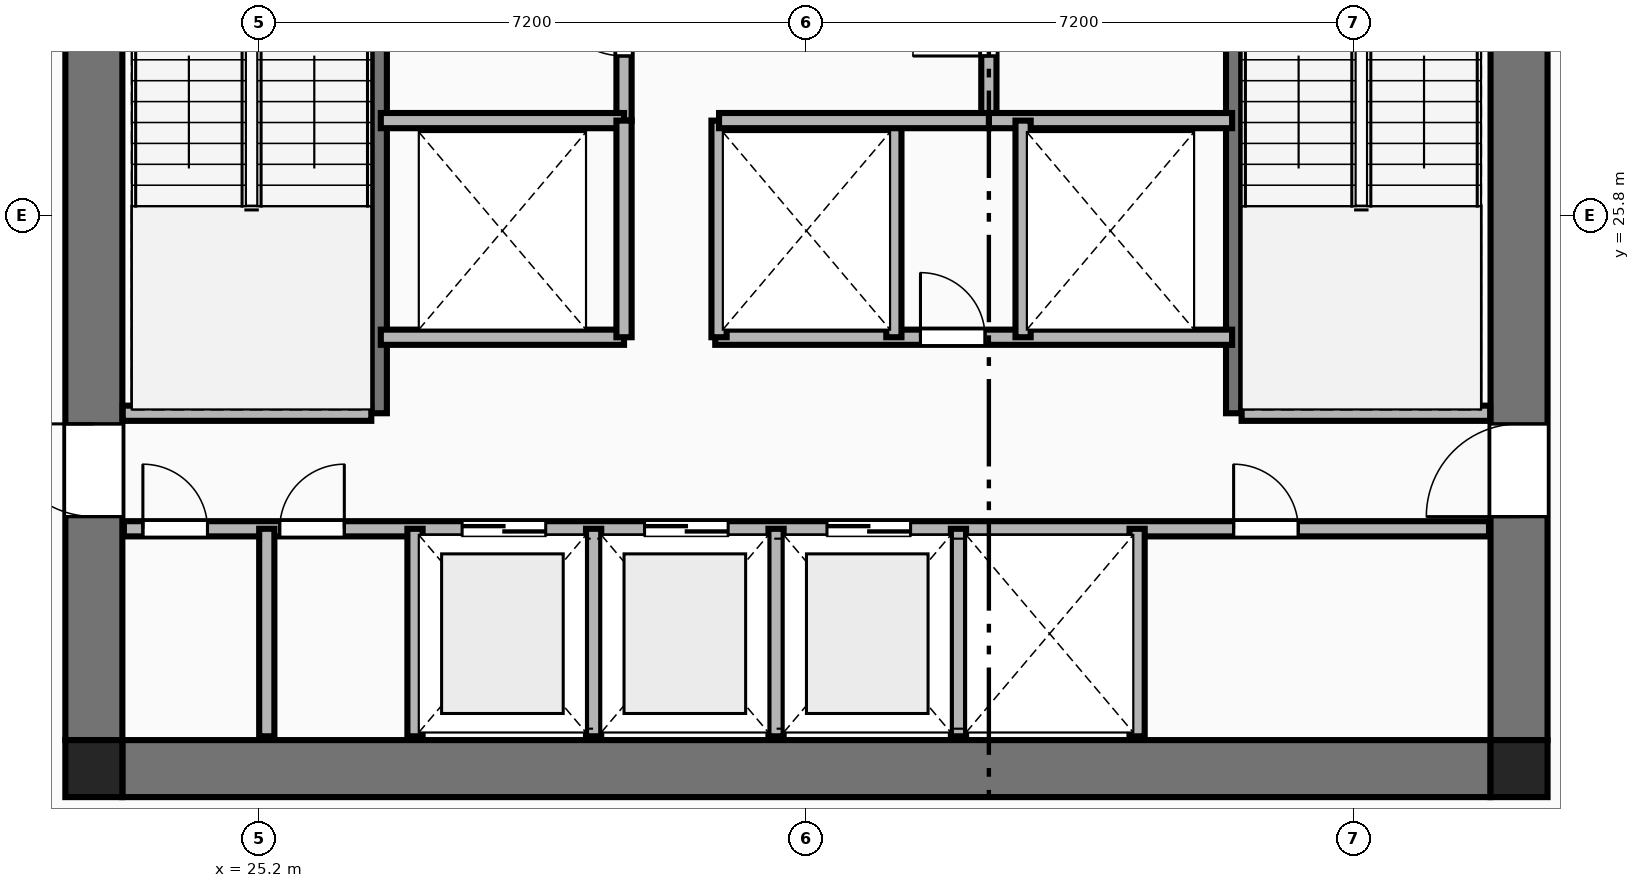
"""IFC4 building model, lengths in metres.
Left out: names, types, materials, properties, quantities, classifications, styles, units other than length and angle.
Written with IfcOpenShell. Run it as: python <this file> out.ifc"""

import sys

from ifc_helpers import new_model, si_unit, direction, frame, frame_2d, origin, origin_2d, place, context, subcontext, project, spatial, rectangle, extrude, element, fill, save


model = new_model("IFC4")
c1 = context("Model", 3, precision=1e-05, world=origin(), true_north=direction((0.0, 1.0)))
c2 = subcontext(c1, "Body", "Model", "MODEL_VIEW")
j1 = project(units=[si_unit("LENGTHUNIT", "METRE"), si_unit("PLANEANGLEUNIT", "RADIAN")], contexts=[c1])
p1 = place(None, origin())
s1 = spatial("IfcSite", under=j1, at=p1, CompositionType="ELEMENT")
p2 = place(p1, origin())
s2 = spatial("IfcBuilding", under=s1, at=p2, CompositionType="ELEMENT")
p3 = place(p2, frame((0.0, 0.0, 87.1)))
s3 = spatial("IfcBuildingStorey", under=s2, at=p3, CompositionType="ELEMENT", Elevation=87.1)
for number, where, z_axis, x_axis in (
    (1, (23.025, 18.525, 0.0), (0.0, 0.0, 1.0), (1.0, 0.0, 0.0)),
    (2, (41.775, 18.525, 0.0), (0.0, 0.0, 1.0), (1.0, 0.0, 0.0)),
):
    element("IfcColumn", number, at=place(p3, frame(where, z_axis=z_axis, x_axis=x_axis)), inside=s3, PredefinedType="COLUMN", context=c2, shape_type="SweptSolid", body=[
        extrude(rectangle(XDim=0.75, YDim=0.75, at=origin_2d()), origin(), (0.0, 0.0, 1.0), 3.55),
    ])
p4 = place(p3, frame((23.4, 18.525, 0.0), z_axis=(0.0, 0.0, 1.0), x_axis=(1.0, 0.0, 0.0)))
e3 = element("IfcWall", 3, at=p4, inside=s3, PredefinedType="SHEAR", context=c2, shape_type="SweptSolid", body=[
    extrude(rectangle(XDim=18.0, YDim=0.75, at=frame_2d((9.0, 0.0))), origin(), (0.0, 0.0, 1.0), 3.33),
])
p5 = place(p3, frame((23.025, 18.9, 0.0), z_axis=(0.0, 0.0, 1.0), x_axis=(0.0, 1.0, 0.0)))
e4 = element("IfcWall", 4, at=p5, inside=s3, PredefinedType="SHEAR", context=c2, shape_type="SweptSolid", body=[
    extrude(rectangle(XDim=14.0, YDim=0.75, at=frame_2d((7.0, 0.0))), origin(), (0.0, 0.0, 1.0), 3.33),
])
p6 = place(p5, frame((2.94, 0.0, 0.0)))
e5 = element("IfcOpeningElement", 5, at=p6, cuts=e4, PredefinedType="OPENING", context=c2, shape_type="SweptSolid", body=[
    extrude(rectangle(XDim=1.22, YDim=2.25, at=frame_2d((0.61, 1.125))), frame((0.0, 0.385, 0.0), z_axis=(0.0, -1.0, 0.0), x_axis=(1.0, 0.0, 0.0)), (0.0, 0.0, 1.0), 0.77),
])
p7 = place(p3, frame((41.775, 18.9, 0.0), z_axis=(0.0, 0.0, 1.0), x_axis=(0.0, 1.0, 0.0)))
e6 = element("IfcWall", 6, at=p7, inside=s3, PredefinedType="SHEAR", context=c2, shape_type="SweptSolid", body=[
    extrude(rectangle(XDim=14.0, YDim=0.75, at=frame_2d((7.0, 0.0))), origin(), (0.0, 0.0, 1.0), 3.33),
])
p8 = place(p7, frame((2.94, 0.0, 0.0)))
e7 = element("IfcOpeningElement", 7, at=p8, cuts=e6, PredefinedType="OPENING", context=c2, shape_type="SweptSolid", body=[
    extrude(rectangle(XDim=1.22, YDim=2.25, at=frame_2d((0.61, 1.125))), frame((0.0, 0.385, 0.0), z_axis=(0.0, -1.0, 0.0), x_axis=(1.0, 0.0, 0.0)), (0.0, 0.0, 1.0), 0.77),
])
p9 = place(p3, frame((26.78, 23.2, 0.0), z_axis=(0.0, 0.0, 1.0), x_axis=(0.0, 1.0, 0.0)))
e8 = element("IfcWall", 8, at=p9, inside=s3, PredefinedType="SHEAR", context=c2, shape_type="SweptSolid", body=[
    extrude(rectangle(XDim=6.78, YDim=0.2, at=frame_2d((3.39, 0.0))), origin(), (0.0, 0.0, 1.0), 3.55),
])
p10 = place(p9, frame((5.32, 0.0, 0.0)))
e9 = element("IfcOpeningElement", 9, at=p10, cuts=e8, PredefinedType="OPENING", context=c2, shape_type="SweptSolid", body=[
    extrude(rectangle(XDim=1.05, YDim=2.15, at=frame_2d((0.525, 1.075))), frame((0.0, 0.11, 0.0), z_axis=(0.0, -1.0, 0.0), x_axis=(1.0, 0.0, 0.0)), (0.0, 0.0, 1.0), 0.22),
])
p11 = place(p3, frame((23.405, 23.2, 0.0), z_axis=(0.0, 0.0, 1.0), x_axis=(1.0, 0.0, 0.0)))
e10 = element("IfcWall", 10, at=p11, inside=s3, PredefinedType="PLUMBINGWALL", context=c2, shape_type="SweptSolid", body=[
    extrude(rectangle(XDim=3.27, YDim=0.2, at=frame_2d((1.635, 0.0))), origin(), (0.0, 0.0, 1.0), 3.33),
])
p12 = place(p3, frame((38.02, 23.2, 0.0), z_axis=(0.0, 0.0, 1.0), x_axis=(0.0, 1.0, 0.0)))
e11 = element("IfcWall", 11, at=p12, inside=s3, PredefinedType="SHEAR", context=c2, shape_type="SweptSolid", body=[
    extrude(rectangle(XDim=6.78, YDim=0.2, at=frame_2d((3.39, 0.0))), origin(), (0.0, 0.0, 1.0), 3.55),
])
p13 = place(p12, frame((5.32, 0.0, 0.0)))
e12 = element("IfcOpeningElement", 12, at=p13, cuts=e11, PredefinedType="OPENING", context=c2, shape_type="SweptSolid", body=[
    extrude(rectangle(XDim=1.05, YDim=2.15, at=frame_2d((0.525, 1.075))), frame((0.0, 0.11, 0.0), z_axis=(0.0, -1.0, 0.0), x_axis=(1.0, 0.0, 0.0)), (0.0, 0.0, 1.0), 0.22),
])
p14 = place(p3, frame((38.125, 23.2, 0.0), z_axis=(0.0, 0.0, 1.0), x_axis=(1.0, 0.0, 0.0)))
e13 = element("IfcWall", 13, at=p14, inside=s3, PredefinedType="PLUMBINGWALL", context=c2, shape_type="SweptSolid", body=[
    extrude(rectangle(XDim=3.27, YDim=0.2, at=frame_2d((1.635, 0.0))), origin(), (0.0, 0.0, 1.0), 3.33),
])
p15 = place(p3, frame((30.0, 27.05, 0.0), z_axis=(0.0, 0.0, 1.0), x_axis=(0.0, 1.0, 0.0)))
e14 = element("IfcWall", 14, at=p15, inside=s3, PredefinedType="PLUMBINGWALL", context=c2, shape_type="SweptSolid", body=[
    extrude(rectangle(XDim=2.75, YDim=0.2, at=frame_2d((1.375, 0.0))), origin(), (0.0, 0.0, 1.0), 3.33),
])
p16 = place(p15, frame((0.85, 0.0, 0.0)))
e15 = element("IfcOpeningElement", 15, at=p16, cuts=e14, PredefinedType="OPENING", context=c2, shape_type="SweptSolid", body=[
    extrude(rectangle(XDim=1.0, YDim=2.15, at=frame_2d((0.5, 1.075))), frame((0.0, 0.11, 0.0), z_axis=(0.0, -1.0, 0.0), x_axis=(1.0, 0.0, 0.0)), (0.0, 0.0, 1.0), 0.22),
])
p17 = place(p3, frame((26.8, 27.05, 0.0), z_axis=(0.0, 0.0, 1.0), x_axis=(1.0, 0.0, 0.0)))
e16 = element("IfcWall", 16, at=p17, inside=s3, PredefinedType="PLUMBINGWALL", context=c2, shape_type="SweptSolid", body=[
    extrude(rectangle(XDim=3.2, YDim=0.2, at=frame_2d((1.6, 0.0))), origin(), (0.0, 0.0, 1.0), 3.33),
])
p18 = place(p3, frame((34.8, 27.05, 0.0), z_axis=(0.0, 0.0, 1.0), x_axis=(0.0, 1.0, 0.0)))
e17 = element("IfcWall", 17, at=p18, inside=s3, PredefinedType="PLUMBINGWALL", context=c2, shape_type="SweptSolid", body=[
    extrude(rectangle(XDim=2.75, YDim=0.2, at=frame_2d((1.375, 0.0))), origin(), (0.0, 0.0, 1.0), 3.33),
])
p19 = place(p18, frame((0.85, 0.0, 0.0)))
e18 = element("IfcOpeningElement", 18, at=p19, cuts=e17, PredefinedType="OPENING", context=c2, shape_type="SweptSolid", body=[
    extrude(rectangle(XDim=1.0, YDim=2.15, at=frame_2d((0.5, 1.075))), frame((0.0, 0.11, 0.0), z_axis=(0.0, -1.0, 0.0), x_axis=(1.0, 0.0, 0.0)), (0.0, 0.0, 1.0), 0.22),
])
for number, where, z_axis, x_axis in (
    (19, (34.8, 27.05, 0.0), (0.0, 0.0, 1.0), (1.0, 0.0, 0.0)),
    (20, (26.8, 24.2, 0.0), (0.0, 0.0, 1.0), (1.0, 0.0, 0.0)),
):
    element("IfcWall", number, at=place(p3, frame(where, z_axis=z_axis, x_axis=x_axis)), inside=s3, PredefinedType="PLUMBINGWALL", context=c2, shape_type="SweptSolid", body=[
        extrude(rectangle(XDim=3.2, YDim=0.2, at=frame_2d((1.6, 0.0))), origin(), (0.0, 0.0, 1.0), 3.33),
    ])
p20 = place(p3, frame((30.0, 24.2, 0.0), z_axis=(0.0, 0.0, 1.0), x_axis=(0.0, 1.0, 0.0)))
e21 = element("IfcWall", 21, at=p20, inside=s3, PredefinedType="PLUMBINGWALL", context=c2, shape_type="SweptSolid", body=[
    extrude(rectangle(XDim=2.85, YDim=0.2, at=frame_2d((1.425, 0.0))), origin(), (0.0, 0.0, 1.0), 3.33),
])
p21 = place(p3, frame((31.2, 24.2, 0.0), z_axis=(0.0, 0.0, 1.0), x_axis=(1.0, 0.0, 0.0)))
e22 = element("IfcWall", 22, at=p21, inside=s3, PredefinedType="PLUMBINGWALL", context=c2, shape_type="SweptSolid", body=[
    extrude(rectangle(XDim=6.8, YDim=0.2, at=frame_2d((3.4, 0.0))), origin(), (0.0, 0.0, 1.0), 3.33),
])
p22 = place(p21, frame((2.7, 0.0, 0.0)))
e23 = element("IfcOpeningElement", 23, at=p22, cuts=e22, PredefinedType="OPENING", context=c2, shape_type="SweptSolid", body=[
    extrude(rectangle(XDim=0.85, YDim=2.05, at=frame_2d((0.425, 1.025))), frame((0.0, 0.11, 0.0), z_axis=(0.0, -1.0, 0.0), x_axis=(1.0, 0.0, 0.0)), (0.0, 0.0, 1.0), 0.22),
])
for number, where, z_axis, x_axis in (
    (24, (31.25, 24.2, 0.0), (0.0, 0.0, 1.0), (0.0, 1.0, 0.0)),
    (25, (33.55, 24.2, 0.0), (0.0, 0.0, 1.0), (0.0, 1.0, 0.0)),
    (26, (35.25, 24.2, 0.0), (0.0, 0.0, 1.0), (0.0, 1.0, 0.0)),
):
    element("IfcWall", number, at=place(p3, frame(where, z_axis=z_axis, x_axis=x_axis)), inside=s3, PredefinedType="PLUMBINGWALL", context=c2, shape_type="SweptSolid", body=[
        extrude(rectangle(XDim=2.85, YDim=0.2, at=frame_2d((1.425, 0.0))), origin(), (0.0, 0.0, 1.0), 3.33),
    ])
p23 = place(p3, frame((31.25, 27.05, 0.0), z_axis=(0.0, 0.0, 1.0), x_axis=(1.0, 0.0, 0.0)))
e27 = element("IfcWall", 27, at=p23, inside=s3, PredefinedType="PLUMBINGWALL", context=c2, shape_type="SweptSolid", body=[
    extrude(rectangle(XDim=3.55, YDim=0.2, at=frame_2d((1.775, 0.0))), origin(), (0.0, 0.0, 1.0), 3.33),
])
p24 = place(p3, frame((23.42, 21.68, 0.0), z_axis=(0.0, 0.0, 1.0), x_axis=(1.0, 0.0, 0.0)))
e28 = element("IfcWall", 28, at=p24, inside=s3, PredefinedType="PLUMBINGWALL", context=c2, shape_type="SweptSolid", body=[
    extrude(rectangle(XDim=17.96, YDim=0.2, at=frame_2d((8.98, 0.0))), origin(), (0.0, 0.0, 1.0), 3.33),
])
p25 = place(p24, frame((4.45, 0.0, 0.0)))
e29 = element("IfcOpeningElement", 29, at=p25, cuts=e28, PredefinedType="OPENING", context=c2, shape_type="SweptSolid", body=[
    extrude(rectangle(XDim=1.1, YDim=2.2, at=frame_2d((0.55, 1.1))), frame((0.0, 0.11, 0.0), z_axis=(0.0, -1.0, 0.0), x_axis=(1.0, 0.0, 0.0)), (0.0, 0.0, 1.0), 0.22),
])
p26 = place(p24, frame((6.85, 0.0, 0.0)))
e30 = element("IfcOpeningElement", 30, at=p26, cuts=e28, PredefinedType="OPENING", context=c2, shape_type="SweptSolid", body=[
    extrude(rectangle(XDim=1.1, YDim=2.2, at=frame_2d((0.55, 1.1))), frame((0.0, 0.11, 0.0), z_axis=(0.0, -1.0, 0.0), x_axis=(1.0, 0.0, 0.0)), (0.0, 0.0, 1.0), 0.22),
])
p27 = place(p24, frame((9.25, 0.0, 0.0)))
e31 = element("IfcOpeningElement", 31, at=p27, cuts=e28, PredefinedType="OPENING", context=c2, shape_type="SweptSolid", body=[
    extrude(rectangle(XDim=1.1, YDim=2.2, at=frame_2d((0.55, 1.1))), frame((0.0, 0.11, 0.0), z_axis=(0.0, -1.0, 0.0), x_axis=(1.0, 0.0, 0.0)), (0.0, 0.0, 1.0), 0.22),
])
p28 = place(p24, frame((0.25, 0.0, 0.0)))
e32 = element("IfcOpeningElement", 32, at=p28, cuts=e28, PredefinedType="OPENING", context=c2, shape_type="SweptSolid", body=[
    extrude(rectangle(XDim=0.85, YDim=2.05, at=frame_2d((0.425, 1.025))), frame((0.0, 0.11, 0.0), z_axis=(0.0, -1.0, 0.0), x_axis=(1.0, 0.0, 0.0)), (0.0, 0.0, 1.0), 0.22),
])
p29 = place(p24, frame((2.05, 0.0, 0.0)))
e33 = element("IfcOpeningElement", 33, at=p29, cuts=e28, PredefinedType="OPENING", context=c2, shape_type="SweptSolid", body=[
    extrude(rectangle(XDim=0.85, YDim=2.05, at=frame_2d((0.425, 1.025))), frame((0.0, 0.11, 0.0), z_axis=(0.0, -1.0, 0.0), x_axis=(1.0, 0.0, 0.0)), (0.0, 0.0, 1.0), 0.22),
])
p30 = place(p24, frame((14.6, 0.0, 0.0)))
e34 = element("IfcOpeningElement", 34, at=p30, cuts=e28, PredefinedType="OPENING", context=c2, shape_type="SweptSolid", body=[
    extrude(rectangle(XDim=0.85, YDim=2.05, at=frame_2d((0.425, 1.025))), frame((0.0, 0.11, 0.0), z_axis=(0.0, -1.0, 0.0), x_axis=(1.0, 0.0, 0.0)), (0.0, 0.0, 1.0), 0.22),
])
for number, where, z_axis, x_axis in (
    (35, (27.25, 18.95, 0.0), (0.0, 0.0, 1.0), (0.0, 1.0, 0.0)),
    (36, (29.6, 18.95, 0.0), (0.0, 0.0, 1.0), (0.0, 1.0, 0.0)),
    (37, (32.0, 18.95, 0.0), (0.0, 0.0, 1.0), (0.0, 1.0, 0.0)),
    (38, (34.4, 18.95, 0.0), (0.0, 0.0, 1.0), (0.0, 1.0, 0.0)),
    (39, (36.75, 18.95, 0.0), (0.0, 0.0, 1.0), (0.0, 1.0, 0.0)),
    (40, (25.3, 18.95, 0.0), (0.0, 0.0, 1.0), (0.0, 1.0, 0.0)),
):
    element("IfcWall", number, at=place(p3, frame(where, z_axis=z_axis, x_axis=x_axis)), inside=s3, PredefinedType="PLUMBINGWALL", context=c2, shape_type="SweptSolid", body=[
        extrude(rectangle(XDim=2.73, YDim=0.2, at=frame_2d((1.365, 0.0))), origin(), (0.0, 0.0, 1.0), 3.33),
    ])
p31 = place(p6, origin())
e41 = element("IfcDoor", 41, at=p31, inside=s3, OperationType="SINGLE_SWING_RIGHT", PredefinedType="DOOR", context=c2, shape_type="SweptSolid", body=[
    extrude(rectangle(XDim=1.22, YDim=2.25, at=frame_2d((0.61, 1.125))), frame((0.0, 0.025, 0.0), z_axis=(0.0, -1.0, 0.0), x_axis=(1.0, 0.0, 0.0)), (0.0, 0.0, 1.0), 0.05),
])
fill(e5, e41)
p32 = place(p8, origin())
e42 = element("IfcDoor", 42, at=p32, inside=s3, OperationType="SINGLE_SWING_LEFT", PredefinedType="DOOR", context=c2, shape_type="SweptSolid", body=[
    extrude(rectangle(XDim=1.22, YDim=2.25, at=frame_2d((0.61, 1.125))), frame((0.0, 0.025, 0.0), z_axis=(0.0, -1.0, 0.0), x_axis=(1.0, 0.0, 0.0)), (0.0, 0.0, 1.0), 0.05),
])
fill(e7, e42)
p33 = place(p16, origin())
e43 = element("IfcDoor", 43, at=p33, inside=s3, OperationType="SINGLE_SWING_RIGHT", PredefinedType="DOOR", context=c2, shape_type="SweptSolid", body=[
    extrude(rectangle(XDim=1.0, YDim=2.15, at=frame_2d((0.5, 1.075))), frame((0.0, 0.025, 0.0), z_axis=(0.0, -1.0, 0.0), x_axis=(1.0, 0.0, 0.0)), (0.0, 0.0, 1.0), 0.05),
])
fill(e15, e43)
p34 = place(p19, origin())
e44 = element("IfcDoor", 44, at=p34, inside=s3, OperationType="SINGLE_SWING_LEFT", PredefinedType="DOOR", context=c2, shape_type="SweptSolid", body=[
    extrude(rectangle(XDim=1.0, YDim=2.15, at=frame_2d((0.5, 1.075))), frame((0.0, 0.025, 0.0), z_axis=(0.0, -1.0, 0.0), x_axis=(1.0, 0.0, 0.0)), (0.0, 0.0, 1.0), 0.05),
])
fill(e18, e44)
p35 = place(p22, origin())
e45 = element("IfcDoor", 45, at=p35, inside=s3, OperationType="SINGLE_SWING_LEFT", PredefinedType="DOOR", context=c2, shape_type="SweptSolid", body=[
    extrude(rectangle(XDim=0.85, YDim=2.05, at=frame_2d((0.425, 1.025))), frame((0.0, 0.025, 0.0), z_axis=(0.0, -1.0, 0.0), x_axis=(1.0, 0.0, 0.0)), (0.0, 0.0, 1.0), 0.05),
])
fill(e23, e45)
p36 = place(p25, origin())
e46 = element("IfcDoor", 46, at=p36, inside=s3, OperationType="DOUBLE_DOOR_SLIDING", PredefinedType="DOOR", context=c2, shape_type="SweptSolid", body=[
    extrude(rectangle(XDim=1.1, YDim=2.2, at=frame_2d((0.55, 1.1))), frame((0.0, 0.025, 0.0), z_axis=(0.0, -1.0, 0.0), x_axis=(1.0, 0.0, 0.0)), (0.0, 0.0, 1.0), 0.05),
])
fill(e29, e46)
p37 = place(p26, origin())
e47 = element("IfcDoor", 47, at=p37, inside=s3, OperationType="DOUBLE_DOOR_SLIDING", PredefinedType="DOOR", context=c2, shape_type="SweptSolid", body=[
    extrude(rectangle(XDim=1.1, YDim=2.2, at=frame_2d((0.55, 1.1))), frame((0.0, 0.025, 0.0), z_axis=(0.0, -1.0, 0.0), x_axis=(1.0, 0.0, 0.0)), (0.0, 0.0, 1.0), 0.05),
])
fill(e30, e47)
p38 = place(p27, origin())
e48 = element("IfcDoor", 48, at=p38, inside=s3, OperationType="DOUBLE_DOOR_SLIDING", PredefinedType="DOOR", context=c2, shape_type="SweptSolid", body=[
    extrude(rectangle(XDim=1.1, YDim=2.2, at=frame_2d((0.55, 1.1))), frame((0.0, 0.025, 0.0), z_axis=(0.0, -1.0, 0.0), x_axis=(1.0, 0.0, 0.0)), (0.0, 0.0, 1.0), 0.05),
])
fill(e31, e48)
p39 = place(p28, origin())
e49 = element("IfcDoor", 49, at=p39, inside=s3, OperationType="SINGLE_SWING_LEFT", PredefinedType="DOOR", context=c2, shape_type="SweptSolid", body=[
    extrude(rectangle(XDim=0.85, YDim=2.05, at=frame_2d((0.425, 1.025))), frame((0.0, 0.025, 0.0), z_axis=(0.0, -1.0, 0.0), x_axis=(1.0, 0.0, 0.0)), (0.0, 0.0, 1.0), 0.05),
])
fill(e32, e49)
p40 = place(p29, origin())
e50 = element("IfcDoor", 50, at=p40, inside=s3, OperationType="SINGLE_SWING_RIGHT", PredefinedType="DOOR", context=c2, shape_type="SweptSolid", body=[
    extrude(rectangle(XDim=0.85, YDim=2.05, at=frame_2d((0.425, 1.025))), frame((0.0, 0.025, 0.0), z_axis=(0.0, -1.0, 0.0), x_axis=(1.0, 0.0, 0.0)), (0.0, 0.0, 1.0), 0.05),
])
fill(e33, e50)
p41 = place(p30, origin())
e51 = element("IfcDoor", 51, at=p41, inside=s3, OperationType="SINGLE_SWING_LEFT", PredefinedType="DOOR", context=c2, shape_type="SweptSolid", body=[
    extrude(rectangle(XDim=0.85, YDim=2.05, at=frame_2d((0.425, 1.025))), frame((0.0, 0.025, 0.0), z_axis=(0.0, -1.0, 0.0), x_axis=(1.0, 0.0, 0.0)), (0.0, 0.0, 1.0), 0.05),
])
fill(e34, e51)
save(model, sys.argv[1])
